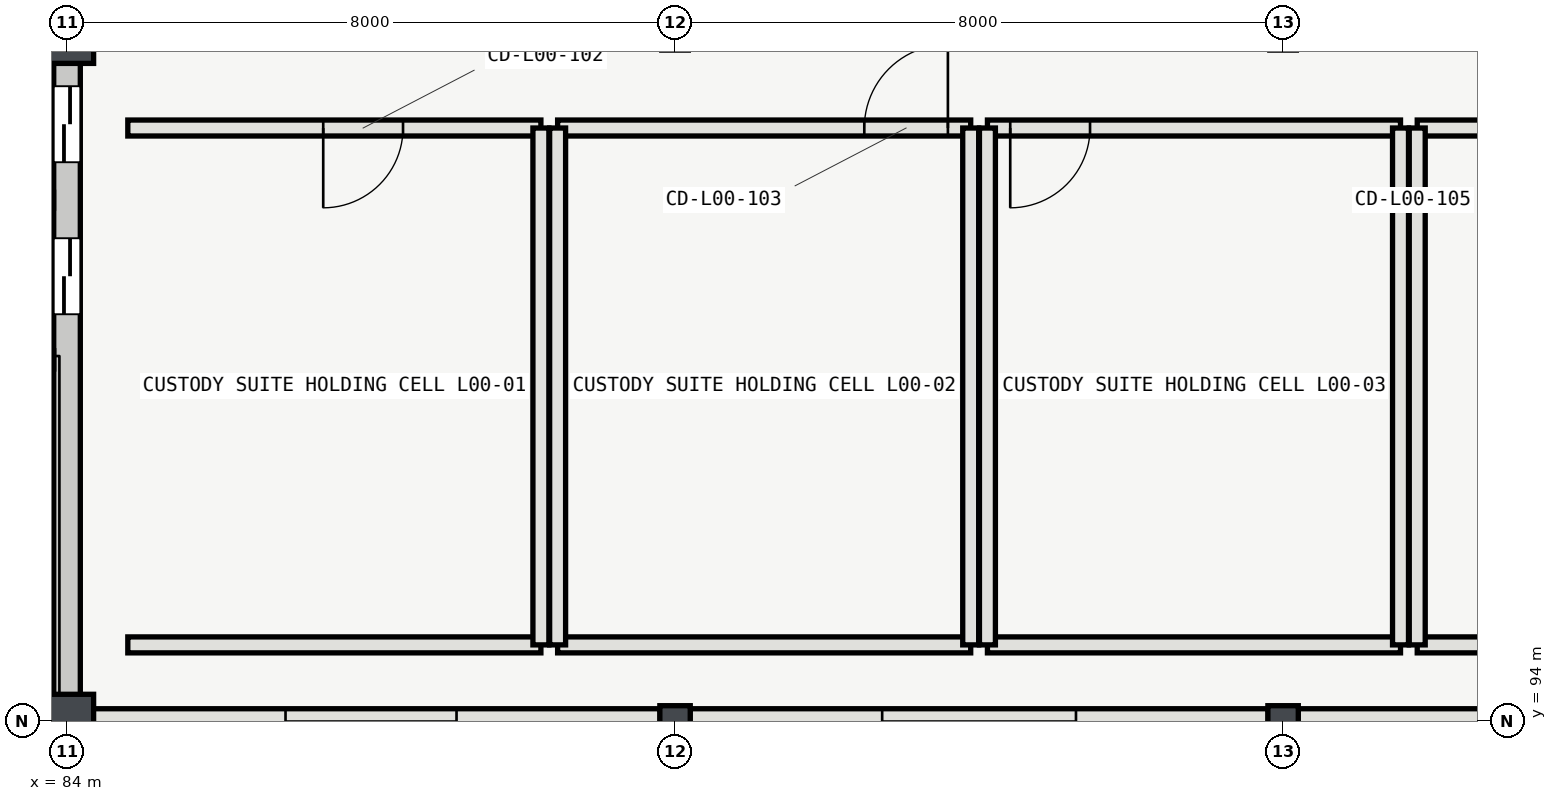
"""IFC4 building model, lengths in metres.
Left out: names, types, materials, properties, quantities, classifications, styles, units other than length and angle.
Written with IfcOpenShell. Run it as: python <this file> out.ifc"""

import sys

from ifc_helpers import new_model, si_unit, direction, frame, frame_2d, origin, origin_2d, place, context, subcontext, project, spatial, rectangle, i_section, extrude, element, fill, save


model = new_model("IFC4")
c1 = context("Model", 3, precision=1e-05, world=origin(), true_north=direction((0.0, 1.0)))
c2 = subcontext(c1, "Body", "Model", "MODEL_VIEW")
j1 = project(units=[si_unit("LENGTHUNIT", "METRE"), si_unit("PLANEANGLEUNIT", "RADIAN")], contexts=[c1])
p1 = place(None, origin())
s1 = spatial("IfcSite", under=j1, at=p1, CompositionType="ELEMENT")
p2 = place(p1, origin())
s2 = spatial("IfcBuilding", under=s1, at=p2, CompositionType="ELEMENT")
p3 = place(p2, origin())
s3 = spatial("IfcBuildingStorey", under=s2, at=p3, CompositionType="ELEMENT", Elevation=0.0)
for number, where, z_axis, x_axis in (
    (1, (84.0, 94.0, 0.0), (0.0, 0.0, 1.0), (1.0, 0.0, 0.0)),
    (2, (84.0, 103.0, 0.0), (0.0, 0.0, 1.0), (1.0, 0.0, 0.0)),
):
    element("IfcColumn", number, at=place(p3, frame(where, z_axis=z_axis, x_axis=x_axis)), inside=s3, PredefinedType="COLUMN", context=c2, shape_type="SweptSolid", body=[
        extrude(rectangle(XDim=0.7, YDim=0.7, at=origin_2d()), origin(), (0.0, 0.0, 1.0), 5.4),
    ])
for number, where, z_axis, x_axis in (
    (3, (92.0, 94.0, 0.0), (0.0, 0.0, 1.0), (1.0, 0.0, 0.0)),
    (4, (100.0, 94.0, 0.0), (0.0, 0.0, 1.0), (1.0, 0.0, 0.0)),
):
    element("IfcColumn", number, at=place(p3, frame(where, z_axis=z_axis, x_axis=x_axis)), inside=s3, PredefinedType="COLUMN", context=c2, shape_type="SweptSolid", body=[
        extrude(i_section(OverallWidth=0.4, OverallDepth=0.4, WebThickness=0.013, FlangeThickness=0.021, FilletRadius=0.022, at=origin_2d()), origin(), (0.0, 0.0, 1.0), 5.4),
    ])
p4 = place(p3, frame((91.804, 94.0, 0.0), z_axis=(0.0, 0.0, 1.0), x_axis=(-1.0, 0.0, 0.0)))
e5 = element("IfcWall", 5, at=p4, inside=s3, PredefinedType="SOLIDWALL", context=c2, shape_type="SweptSolid", body=[
    extrude(rectangle(XDim=7.458, YDim=0.32, at=frame_2d((3.729, 0.0))), origin(), (0.0, 0.0, 1.0), 4.663),
])
p5 = place(p4, frame((2.679, 0.0, 0.95)))
e6 = element("IfcOpeningElement", 6, at=p5, cuts=e5, PredefinedType="OPENING", context=c2, shape_type="SweptSolid", body=[
    extrude(rectangle(XDim=2.25, YDim=1.95, at=frame_2d((1.125, 0.975))), frame((0.0, 0.17, 0.0), z_axis=(0.0, -1.0, 0.0), x_axis=(1.0, 0.0, 0.0)), (0.0, 0.0, 1.0), 0.34),
])
p6 = place(p3, frame((99.804, 94.0, 0.0), z_axis=(0.0, 0.0, 1.0), x_axis=(-1.0, 0.0, 0.0)))
e7 = element("IfcWall", 7, at=p6, inside=s3, PredefinedType="SOLIDWALL", context=c2, shape_type="SweptSolid", body=[
    extrude(rectangle(XDim=7.608, YDim=0.32, at=frame_2d((3.804, 0.0))), origin(), (0.0, 0.0, 1.0), 4.663),
])
p7 = place(p6, frame((2.529, 0.0, 0.95)))
e8 = element("IfcOpeningElement", 8, at=p7, cuts=e7, PredefinedType="OPENING", context=c2, shape_type="SweptSolid", body=[
    extrude(rectangle(XDim=2.55, YDim=1.95, at=frame_2d((1.275, 0.975))), frame((0.0, 0.17, 0.0), z_axis=(0.0, -1.0, 0.0), x_axis=(1.0, 0.0, 0.0)), (0.0, 0.0, 1.0), 0.34),
])
p8 = place(p3, frame((107.804, 94.0, 0.0), z_axis=(0.0, 0.0, 1.0), x_axis=(-1.0, 0.0, 0.0)))
e9 = element("IfcWall", 9, at=p8, inside=s3, PredefinedType="SOLIDWALL", context=c2, shape_type="SweptSolid", body=[
    extrude(rectangle(XDim=7.608, YDim=0.32, at=frame_2d((3.804, 0.0))), origin(), (0.0, 0.0, 1.0), 4.663),
])
p9 = place(p8, frame((2.429, 0.0, 0.95)))
e10 = element("IfcOpeningElement", 10, at=p9, cuts=e9, PredefinedType="OPENING", context=c2, shape_type="SweptSolid", body=[
    extrude(rectangle(XDim=2.75, YDim=1.95, at=frame_2d((1.375, 0.975))), frame((0.0, 0.17, 0.0), z_axis=(0.0, -1.0, 0.0), x_axis=(1.0, 0.0, 0.0)), (0.0, 0.0, 1.0), 0.34),
])
p10 = place(p3, frame((75.825, 94.0, 0.0), z_axis=(0.0, 0.0, 1.0), x_axis=(1.0, 0.0, 0.0)))
e11 = element("IfcWall", 11, at=p10, inside=s3, PredefinedType="SHEAR", context=c2, shape_type="SweptSolid", body=[
    extrude(rectangle(XDim=8.35, YDim=0.35, at=frame_2d((4.175, 0.0))), origin(), (0.0, 0.0, 1.0), 5.12),
])
p11 = place(p3, frame((84.0, 94.175, 0.0), z_axis=(0.0, 0.0, 1.0), x_axis=(0.0, 1.0, 0.0)))
e12 = element("IfcWall", 12, at=p11, inside=s3, PredefinedType="SHEAR", context=c2, shape_type="SweptSolid", body=[
    extrude(rectangle(XDim=8.65, YDim=0.35, at=frame_2d((4.325, 0.0))), origin(), (0.0, 0.0, 1.0), 5.12),
])
p12 = place(p11, frame((5.175, 0.0, 0.0)))
e13 = element("IfcOpeningElement", 13, at=p12, cuts=e12, PredefinedType="OPENING", context=c2, shape_type="SweptSolid", body=[
    extrude(rectangle(XDim=1.0, YDim=2.15, at=frame_2d((0.5, 1.075))), frame((0.0, 0.185, 0.0), z_axis=(0.0, -1.0, 0.0), x_axis=(1.0, 0.0, 0.0)), (0.0, 0.0, 1.0), 0.37),
])
p13 = place(p11, frame((7.175, 0.0, 0.0)))
e14 = element("IfcOpeningElement", 14, at=p13, cuts=e12, PredefinedType="OPENING", context=c2, shape_type="SweptSolid", body=[
    extrude(rectangle(XDim=1.0, YDim=2.15, at=frame_2d((0.5, 1.075))), frame((0.0, 0.185, 0.0), z_axis=(0.0, -1.0, 0.0), x_axis=(1.0, 0.0, 0.0)), (0.0, 0.0, 1.0), 0.37),
])
p14 = place(p3, frame((81.572, 100.85, 0.0), z_axis=(0.0, 0.0, 1.0), x_axis=(1.0, 0.0, 0.0)))
e15 = element("IfcWall", 15, at=p14, inside=s3, PredefinedType="PARTITIONING", context=c2, shape_type="SweptSolid", body=[
    extrude(rectangle(XDim=2.251, YDim=0.21, at=frame_2d((1.125, 0.0))), origin(), (0.0, 0.0, 1.0), 5.12),
])
p15 = place(p3, frame((84.8, 95.0, 0.0), z_axis=(0.0, 0.0, 1.0), x_axis=(1.0, 0.0, 0.0)))
e16 = element("IfcWall", 16, at=p15, inside=s3, PredefinedType="PARTITIONING", context=c2, shape_type="SweptSolid", body=[
    extrude(rectangle(XDim=5.435, YDim=0.21, at=frame_2d((2.718, 0.0))), origin(), (0.0, 0.0, 1.0), 5.12),
])
p16 = place(p3, frame((90.235, 101.8, 0.0), z_axis=(0.0, 0.0, 1.0), x_axis=(-1.0, 0.0, 0.0)))
e17 = element("IfcWall", 17, at=p16, inside=s3, PredefinedType="PARTITIONING", context=c2, shape_type="SweptSolid", body=[
    extrude(rectangle(XDim=5.435, YDim=0.21, at=frame_2d((2.718, 0.0))), origin(), (0.0, 0.0, 1.0), 5.12),
])
p17 = place(p16, frame((1.814, 0.0, 0.0)))
e18 = element("IfcOpeningElement", 18, at=p17, cuts=e17, PredefinedType="OPENING", context=c2, shape_type="SweptSolid", body=[
    extrude(rectangle(XDim=1.05, YDim=2.15, at=frame_2d((0.525, 1.075))), frame((0.0, 0.115, 0.0), z_axis=(0.0, -1.0, 0.0), x_axis=(1.0, 0.0, 0.0)), (0.0, 0.0, 1.0), 0.23),
])
p18 = place(p3, frame((90.235, 95.0, 0.0), z_axis=(0.0, 0.0, 1.0), x_axis=(0.0, 1.0, 0.0)))
e19 = element("IfcWall", 19, at=p18, inside=s3, PredefinedType="PARTITIONING", context=c2, shape_type="SweptSolid", body=[
    extrude(rectangle(XDim=6.8, YDim=0.21, at=frame_2d((3.4, 0.0))), origin(), (0.0, 0.0, 1.0), 5.12),
])
p19 = place(p3, frame((90.455, 95.0, 0.0), z_axis=(0.0, 0.0, 1.0), x_axis=(1.0, 0.0, 0.0)))
e20 = element("IfcWall", 20, at=p19, inside=s3, PredefinedType="PARTITIONING", context=c2, shape_type="SweptSolid", body=[
    extrude(rectangle(XDim=5.435, YDim=0.21, at=frame_2d((2.717, 0.0))), origin(), (0.0, 0.0, 1.0), 5.12),
])
p20 = place(p3, frame((95.89, 101.8, 0.0), z_axis=(0.0, 0.0, 1.0), x_axis=(-1.0, 0.0, 0.0)))
e21 = element("IfcWall", 21, at=p20, inside=s3, PredefinedType="PARTITIONING", context=c2, shape_type="SweptSolid", body=[
    extrude(rectangle(XDim=5.435, YDim=0.21, at=frame_2d((2.717, 0.0))), origin(), (0.0, 0.0, 1.0), 5.12),
])
p21 = place(p20, frame((0.3, 0.0, 0.0)))
e22 = element("IfcOpeningElement", 22, at=p21, cuts=e21, PredefinedType="OPENING", context=c2, shape_type="SweptSolid", body=[
    extrude(rectangle(XDim=1.1, YDim=2.15, at=frame_2d((0.55, 1.075))), frame((0.0, 0.115, 0.0), z_axis=(0.0, -1.0, 0.0), x_axis=(1.0, 0.0, 0.0)), (0.0, 0.0, 1.0), 0.23),
])
p22 = place(p3, frame((90.455, 101.8, 0.0), z_axis=(0.0, 0.0, 1.0), x_axis=(0.0, -1.0, 0.0)))
e23 = element("IfcWall", 23, at=p22, inside=s3, PredefinedType="PARTITIONING", context=c2, shape_type="SweptSolid", body=[
    extrude(rectangle(XDim=6.8, YDim=0.21, at=frame_2d((3.4, 0.0))), origin(), (0.0, 0.0, 1.0), 5.12),
])
p23 = place(p3, frame((95.89, 95.0, 0.0), z_axis=(0.0, 0.0, 1.0), x_axis=(0.0, 1.0, 0.0)))
e24 = element("IfcWall", 24, at=p23, inside=s3, PredefinedType="PARTITIONING", context=c2, shape_type="SweptSolid", body=[
    extrude(rectangle(XDim=6.8, YDim=0.21, at=frame_2d((3.4, 0.0))), origin(), (0.0, 0.0, 1.0), 4.726),
])
p24 = place(p3, frame((96.11, 95.0, 0.0), z_axis=(0.0, 0.0, 1.0), x_axis=(1.0, 0.0, 0.0)))
e25 = element("IfcWall", 25, at=p24, inside=s3, PredefinedType="PARTITIONING", context=c2, shape_type="SweptSolid", body=[
    extrude(rectangle(XDim=5.435, YDim=0.21, at=frame_2d((2.717, 0.0))), origin(), (0.0, 0.0, 1.0), 5.12),
])
p25 = place(p3, frame((101.545, 101.8, 0.0), z_axis=(0.0, 0.0, 1.0), x_axis=(-1.0, 0.0, 0.0)))
e26 = element("IfcWall", 26, at=p25, inside=s3, PredefinedType="PARTITIONING", context=c2, shape_type="SweptSolid", body=[
    extrude(rectangle(XDim=5.435, YDim=0.21, at=frame_2d((2.717, 0.0))), origin(), (0.0, 0.0, 1.0), 5.12),
])
p26 = place(p25, frame((4.085, 0.0, 0.0)))
e27 = element("IfcOpeningElement", 27, at=p26, cuts=e26, PredefinedType="OPENING", context=c2, shape_type="SweptSolid", body=[
    extrude(rectangle(XDim=1.05, YDim=2.15, at=frame_2d((0.525, 1.075))), frame((0.0, 0.115, 0.0), z_axis=(0.0, -1.0, 0.0), x_axis=(1.0, 0.0, 0.0)), (0.0, 0.0, 1.0), 0.23),
])
p27 = place(p3, frame((96.11, 101.8, 0.0), z_axis=(0.0, 0.0, 1.0), x_axis=(0.0, -1.0, 0.0)))
e28 = element("IfcWall", 28, at=p27, inside=s3, PredefinedType="PARTITIONING", context=c2, shape_type="SweptSolid", body=[
    extrude(rectangle(XDim=6.8, YDim=0.21, at=frame_2d((3.4, 0.0))), origin(), (0.0, 0.0, 1.0), 4.726),
])
p28 = place(p3, frame((101.545, 95.0, 0.0), z_axis=(0.0, 0.0, 1.0), x_axis=(0.0, 1.0, 0.0)))
e29 = element("IfcWall", 29, at=p28, inside=s3, PredefinedType="PARTITIONING", context=c2, shape_type="SweptSolid", body=[
    extrude(rectangle(XDim=6.8, YDim=0.21, at=frame_2d((3.4, 0.0))), origin(), (0.0, 0.0, 1.0), 5.12),
])
p29 = place(p3, frame((101.765, 95.0, 0.0), z_axis=(0.0, 0.0, 1.0), x_axis=(1.0, 0.0, 0.0)))
e30 = element("IfcWall", 30, at=p29, inside=s3, PredefinedType="PARTITIONING", context=c2, shape_type="SweptSolid", body=[
    extrude(rectangle(XDim=5.435, YDim=0.21, at=frame_2d((2.718, 0.0))), origin(), (0.0, 0.0, 1.0), 5.12),
])
p30 = place(p3, frame((107.2, 101.8, 0.0), z_axis=(0.0, 0.0, 1.0), x_axis=(-1.0, 0.0, 0.0)))
e31 = element("IfcWall", 31, at=p30, inside=s3, PredefinedType="PARTITIONING", context=c2, shape_type="SweptSolid", body=[
    extrude(rectangle(XDim=5.435, YDim=0.21, at=frame_2d((2.718, 0.0))), origin(), (0.0, 0.0, 1.0), 5.12),
])
p31 = place(p30, frame((2.541, 0.0, 0.0)))
e32 = element("IfcOpeningElement", 32, at=p31, cuts=e31, PredefinedType="OPENING", context=c2, shape_type="SweptSolid", body=[
    extrude(rectangle(XDim=1.1, YDim=2.15, at=frame_2d((0.55, 1.075))), frame((0.0, 0.115, 0.0), z_axis=(0.0, -1.0, 0.0), x_axis=(1.0, 0.0, 0.0)), (0.0, 0.0, 1.0), 0.23),
])
p32 = place(p3, frame((101.765, 101.8, 0.0), z_axis=(0.0, 0.0, 1.0), x_axis=(0.0, -1.0, 0.0)))
e33 = element("IfcWall", 33, at=p32, inside=s3, PredefinedType="PARTITIONING", context=c2, shape_type="SweptSolid", body=[
    extrude(rectangle(XDim=6.8, YDim=0.21, at=frame_2d((3.4, 0.0))), origin(), (0.0, 0.0, 1.0), 5.12),
])
p33 = place(p3, frame((76.175, 98.75, 0.0), z_axis=(0.0, 0.0, 1.0), x_axis=(1.0, 0.0, 0.0)))
e34 = element("IfcWall", 34, at=p33, inside=s3, PredefinedType="SHEAR", context=c2, shape_type="SweptSolid", body=[
    extrude(rectangle(XDim=7.65, YDim=0.24, at=frame_2d((3.825, 0.0))), origin(), (0.0, 0.0, 1.0), 5.12),
])
p34 = place(p5, origin())
e35 = element("IfcWindow", 35, at=p34, inside=s3, PartitioningType="SINGLE_PANEL", PredefinedType="WINDOW", context=c2, shape_type="SweptSolid", body=[
    extrude(rectangle(XDim=2.25, YDim=1.95, at=frame_2d((1.125, 0.975))), frame((0.0, 0.03, 0.0), z_axis=(0.0, -1.0, 0.0), x_axis=(1.0, 0.0, 0.0)), (0.0, 0.0, 1.0), 0.06),
])
fill(e6, e35)
p35 = place(p7, origin())
e36 = element("IfcWindow", 36, at=p35, inside=s3, PartitioningType="SINGLE_PANEL", PredefinedType="WINDOW", context=c2, shape_type="SweptSolid", body=[
    extrude(rectangle(XDim=2.55, YDim=1.95, at=frame_2d((1.275, 0.975))), frame((0.0, 0.03, 0.0), z_axis=(0.0, -1.0, 0.0), x_axis=(1.0, 0.0, 0.0)), (0.0, 0.0, 1.0), 0.06),
])
fill(e8, e36)
p36 = place(p12, origin())
e37 = element("IfcDoor", 37, at=p36, inside=s3, OperationType="DOUBLE_DOOR_SLIDING", PredefinedType="DOOR", context=c2, shape_type="SweptSolid", body=[
    extrude(rectangle(XDim=1.0, YDim=2.15, at=frame_2d((0.5, 1.075))), frame((0.0, 0.025, 0.0), z_axis=(0.0, -1.0, 0.0), x_axis=(1.0, 0.0, 0.0)), (0.0, 0.0, 1.0), 0.05),
])
fill(e13, e37)
p37 = place(p13, origin())
e38 = element("IfcDoor", 38, at=p37, inside=s3, OperationType="DOUBLE_DOOR_SLIDING", PredefinedType="DOOR", context=c2, shape_type="SweptSolid", body=[
    extrude(rectangle(XDim=1.0, YDim=2.15, at=frame_2d((0.5, 1.075))), frame((0.0, 0.025, 0.0), z_axis=(0.0, -1.0, 0.0), x_axis=(1.0, 0.0, 0.0)), (0.0, 0.0, 1.0), 0.05),
])
fill(e14, e38)
p38 = place(p17, origin())
e39 = element("IfcDoor", 39, at=p38, inside=s3, OperationType="SINGLE_SWING_RIGHT", PredefinedType="DOOR", context=c2, shape_type="SweptSolid", body=[
    extrude(rectangle(XDim=1.05, YDim=2.15, at=frame_2d((0.525, 1.075))), frame((0.0, 0.025, 0.0), z_axis=(0.0, -1.0, 0.0), x_axis=(1.0, 0.0, 0.0)), (0.0, 0.0, 1.0), 0.05),
])
fill(e18, e39)
p39 = place(p21, origin())
e40 = element("IfcDoor", 40, at=p39, inside=s3, OperationType="SINGLE_SWING_LEFT", PredefinedType="DOOR", context=c2, shape_type="SweptSolid", body=[
    extrude(rectangle(XDim=1.1, YDim=2.15, at=frame_2d((0.55, 1.075))), frame((0.0, 0.025, 0.0), z_axis=(0.0, -1.0, 0.0), x_axis=(1.0, 0.0, 0.0)), (0.0, 0.0, 1.0), 0.05),
])
fill(e22, e40)
p40 = place(p26, origin())
e41 = element("IfcDoor", 41, at=p40, inside=s3, OperationType="SINGLE_SWING_RIGHT", PredefinedType="DOOR", context=c2, shape_type="SweptSolid", body=[
    extrude(rectangle(XDim=1.05, YDim=2.15, at=frame_2d((0.525, 1.075))), frame((0.0, 0.025, 0.0), z_axis=(0.0, -1.0, 0.0), x_axis=(1.0, 0.0, 0.0)), (0.0, 0.0, 1.0), 0.05),
])
fill(e27, e41)
save(model, sys.argv[1])
